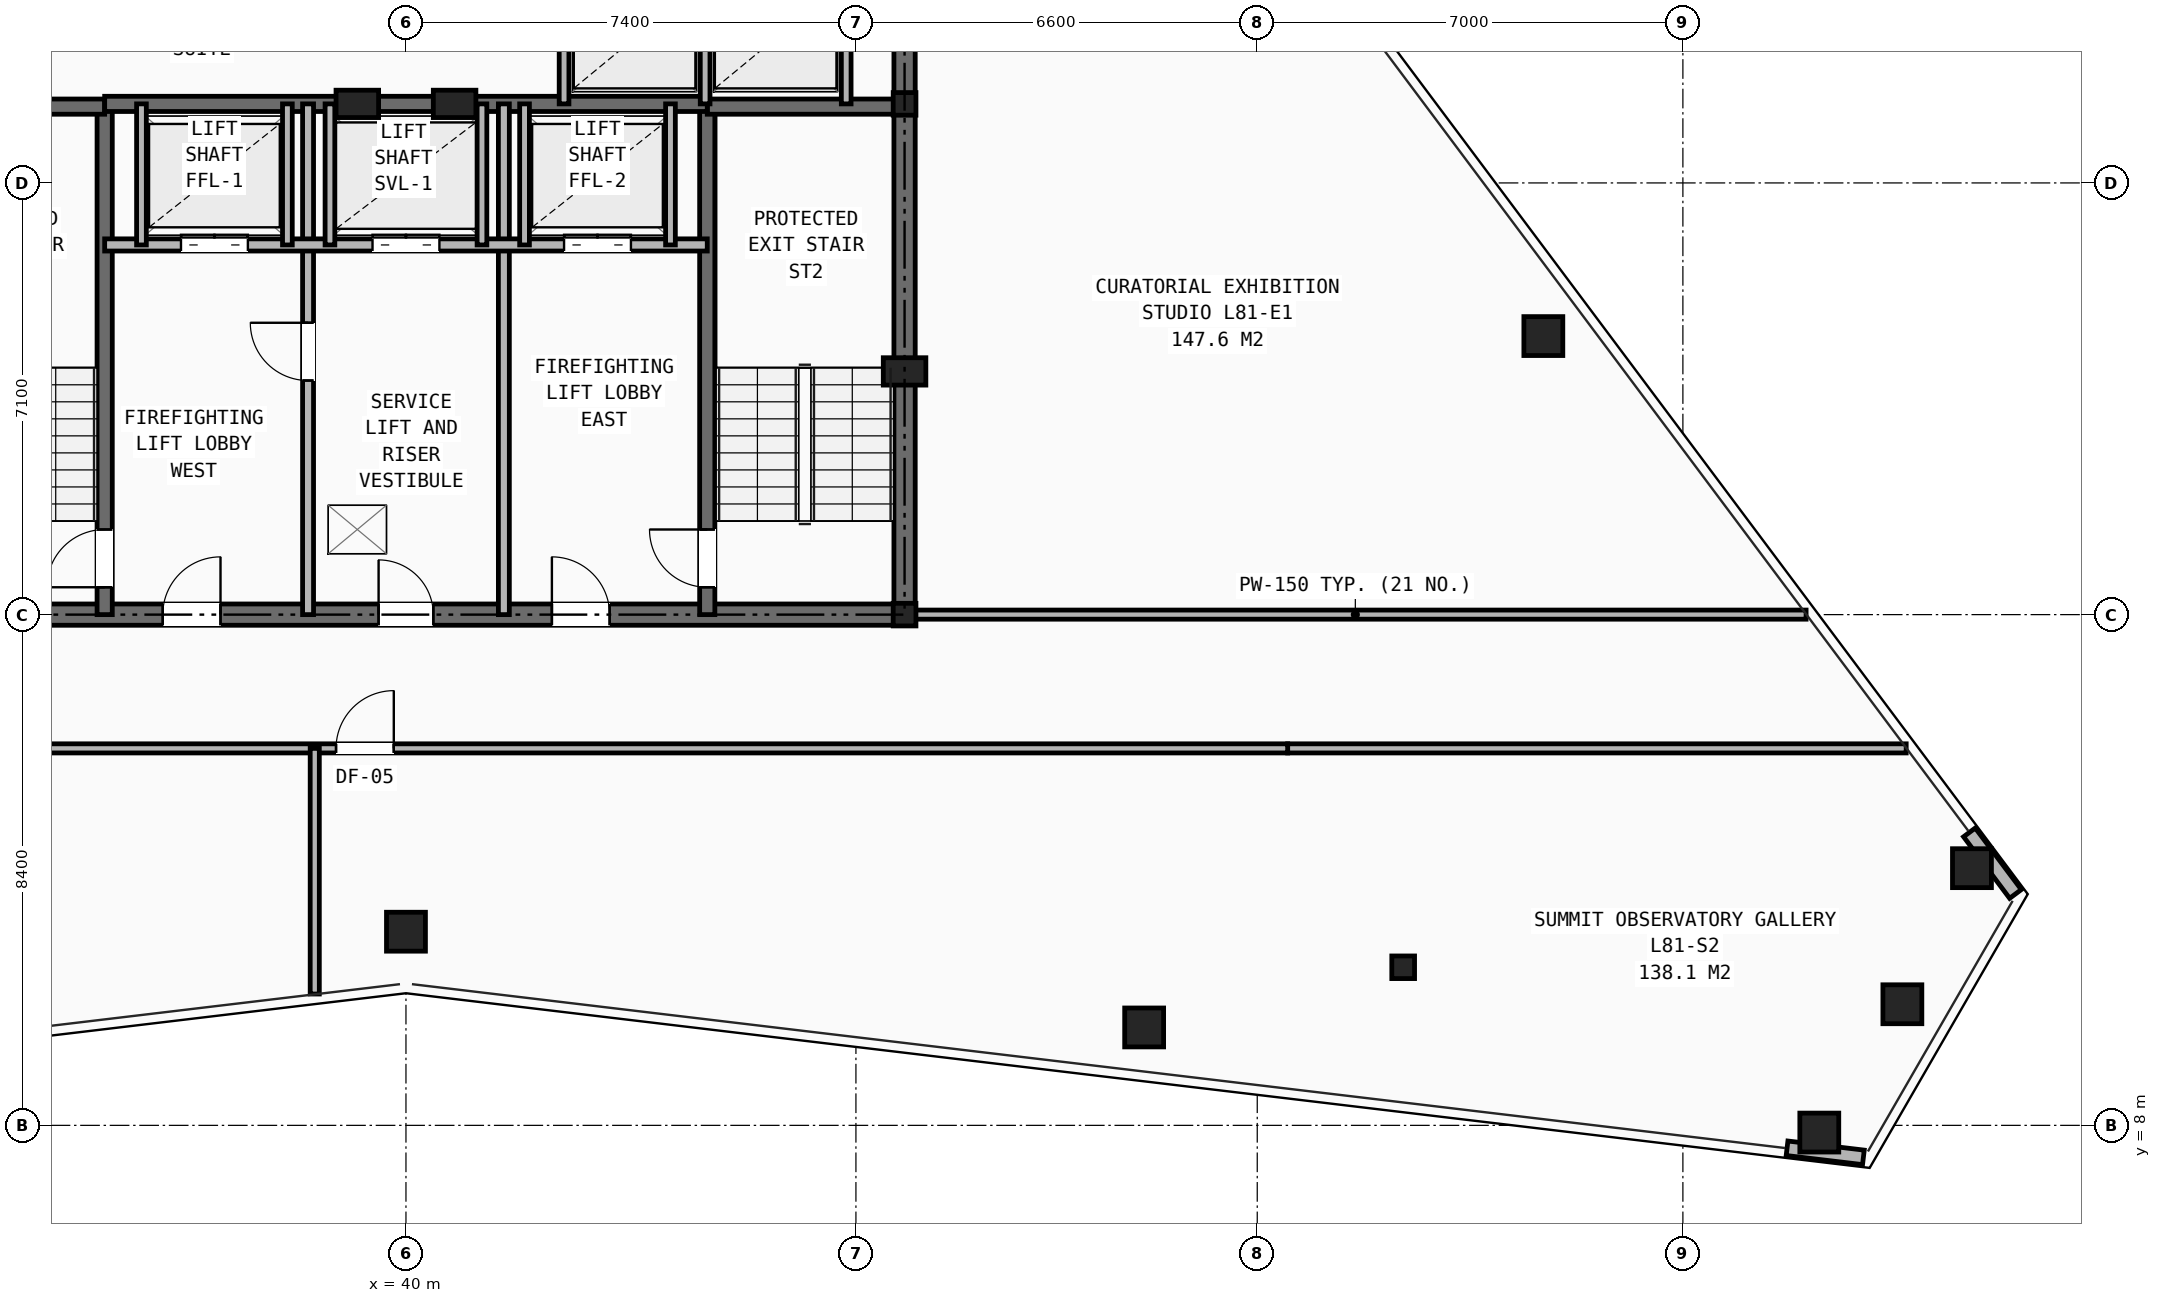
"""IFC4 building model, lengths in metres.
Left out: names, types, materials, properties, quantities, classifications, styles, units other than length and angle.
Written with IfcOpenShell. Run it as: python <this file> out.ifc"""

import sys

from ifc_helpers import new_model, si_unit, direction, frame, frame_2d, origin, origin_2d, place, context, subcontext, project, spatial, rectangle, hollow_rectangle, i_section, extrude, element, fill, save


model = new_model("IFC4")
c1 = context("Model", 3, precision=1e-05, world=origin(), true_north=direction((0.0, 1.0)))
c2 = subcontext(c1, "Body", "Model", "MODEL_VIEW")
j1 = project(units=[si_unit("LENGTHUNIT", "METRE"), si_unit("PLANEANGLEUNIT", "RADIAN")], contexts=[c1])
p1 = place(None, origin())
s1 = spatial("IfcSite", under=j1, at=p1, CompositionType="ELEMENT")
p2 = place(p1, origin())
s2 = spatial("IfcBuilding", under=s1, at=p2, CompositionType="ELEMENT")
p3 = place(p2, frame((0.0, 0.0, 286.5)))
s3 = spatial("IfcBuildingStorey", under=s2, at=p3, CompositionType="ELEMENT", Elevation=286.5)
for number, where, z_axis, x_axis in (
    (1, (48.2, 16.4, 0.0), (0.0, 0.0, 1.0), (1.0, 0.0, 0.0)),
    (2, (48.2, 24.8, 0.0), (0.0, 0.0, 1.0), (1.0, 0.0, 0.0)),
    (3, (56.4, 10.6, 0.0), (0.0, 0.0, 1.0), (1.0, 0.0, 0.0)),
):
    element("IfcColumn", number, at=place(p3, frame(where, z_axis=z_axis, x_axis=x_axis)), inside=s3, PredefinedType="COLUMN", context=c2, shape_type="SweptSolid", body=[
        extrude(i_section(OverallWidth=0.374, OverallDepth=0.372, WebThickness=0.016, FlangeThickness=0.026, at=origin_2d()), origin(), (0.0, 0.0, 1.0), 3.5),
    ])
for number, where, z_axis, x_axis in (
    (4, (48.2, 20.4, 0.0), (0.0, 0.0, 1.0), (1.0, 0.0, 0.0)),
    (5, (39.2, 24.8, 0.0), (0.0, 0.0, 1.0), (1.0, 0.0, 0.0)),
    (6, (40.8, 24.8, 0.0), (0.0, 0.0, 1.0), (1.0, 0.0, 0.0)),
):
    element("IfcColumn", number, at=place(p3, frame(where, z_axis=z_axis, x_axis=x_axis)), inside=s3, PredefinedType="PILASTER", context=c2, shape_type="SweptSolid", body=[
        extrude(rectangle(XDim=0.7, YDim=0.45, at=origin_2d()), origin(), (0.0, 0.0, 1.0), 3.5),
    ])
for number, where, z_axis, x_axis in (
    (7, (40.0, 11.185, 0.0), (0.0, 0.0, 1.0), (1.0, 0.0, 0.0)),
    (8, (52.14, 9.61, 0.0), (0.0, 0.0, 1.0), (1.0, 0.0, 0.0)),
    (9, (63.243, 7.882, 0.0), (0.0, 0.0, 1.0), (1.0, 0.0, 0.0)),
    (10, (64.61, 9.992, 0.0), (0.0, 0.0, 1.0), (1.0, 0.0, 0.0)),
    (11, (65.754, 12.23, 0.0), (0.0, 0.0, 1.0), (1.0, 0.0, 0.0)),
    (12, (58.705, 20.981, 0.0), (0.0, 0.0, 1.0), (1.0, 0.0, 0.0)),
):
    element("IfcColumn", number, at=place(p3, frame(where, z_axis=z_axis, x_axis=x_axis)), inside=s3, PredefinedType="COLUMN", context=c2, shape_type="SweptSolid", body=[
        extrude(hollow_rectangle(XDim=0.64, YDim=0.64, WallThickness=0.045, at=origin_2d()), origin(), (0.0, 0.0, 1.0), 3.5),
    ])
p4 = place(p3, frame((62.713, 7.623, 0.0), z_axis=(0.0, 0.0, 1.0), x_axis=(0.992948828443, -0.118543764469, 0.0)))
e13 = element("IfcWall", 13, at=p4, inside=s3, PredefinedType="SHEAR", context=c2, shape_type="SweptSolid", body=[
    extrude(rectangle(XDim=1.265, YDim=0.24, at=frame_2d((0.632, 0.0))), origin(), (0.0, 0.0, 1.0), 2.573),
])
p5 = place(p3, frame((66.47, 11.806, 0.0), z_axis=(0.0, 0.0, 1.0), x_axis=(-0.5991037677, 0.800671390477, 0.0)))
e14 = element("IfcWall", 14, at=p5, inside=s3, PredefinedType="SHEAR", context=c2, shape_type="SweptSolid", body=[
    extrude(rectangle(XDim=1.264, YDim=0.24, at=frame_2d((0.632, 0.0))), origin(), (0.0, 0.0, 1.0), 2.573),
])
p6 = place(p3, frame((31.8, 16.4, 0.0), z_axis=(0.0, 0.0, 1.0), x_axis=(1.0, 0.0, 0.0)))
e15 = element("IfcWall", 15, at=p6, inside=s3, PredefinedType="SHEAR", context=c2, shape_type="SweptSolid", body=[
    extrude(rectangle(XDim=16.4, YDim=0.35, at=frame_2d((8.2, 0.0))), origin(), (0.0, 0.0, 1.0), 3.2),
])
p7 = place(p6, frame((7.75, 0.0, 0.0)))
e16 = element("IfcOpeningElement", 16, at=p7, cuts=e15, PredefinedType="OPENING", context=c2, shape_type="SweptSolid", body=[
    extrude(rectangle(XDim=0.9, YDim=2.1, at=frame_2d((0.45, 1.05))), frame((0.0, 0.185, 0.0), z_axis=(0.0, -1.0, 0.0), x_axis=(1.0, 0.0, 0.0)), (0.0, 0.0, 1.0), 0.37),
])
p8 = place(p6, frame((4.2, 0.0, 0.0)))
e17 = element("IfcOpeningElement", 17, at=p8, cuts=e15, PredefinedType="OPENING", context=c2, shape_type="SweptSolid", body=[
    extrude(rectangle(XDim=0.95, YDim=2.1, at=frame_2d((0.475, 1.05))), frame((0.0, 0.185, 0.0), z_axis=(0.0, -1.0, 0.0), x_axis=(1.0, 0.0, 0.0)), (0.0, 0.0, 1.0), 0.37),
])
p9 = place(p6, frame((10.6, 0.0, 0.0)))
e18 = element("IfcOpeningElement", 18, at=p9, cuts=e15, PredefinedType="OPENING", context=c2, shape_type="SweptSolid", body=[
    extrude(rectangle(XDim=0.95, YDim=2.1, at=frame_2d((0.475, 1.05))), frame((0.0, 0.185, 0.0), z_axis=(0.0, -1.0, 0.0), x_axis=(1.0, 0.0, 0.0)), (0.0, 0.0, 1.0), 0.37),
])
p10 = place(p3, frame((48.2, 16.4, 0.0), z_axis=(0.0, 0.0, 1.0), x_axis=(0.0, 1.0, 0.0)))
e19 = element("IfcWall", 19, at=p10, inside=s3, PredefinedType="SHEAR", context=c2, shape_type="SweptSolid", body=[
    extrude(rectangle(XDim=14.8, YDim=0.35, at=frame_2d((7.4, 0.0))), origin(), (0.0, 0.0, 1.0), 3.2),
])
p11 = place(p10, frame((11.0, 0.0, 0.0)))
e20 = element("IfcOpeningElement", 20, at=p11, cuts=e19, PredefinedType="OPENING", context=c2, shape_type="SweptSolid", body=[
    extrude(rectangle(XDim=1.1, YDim=2.15, at=frame_2d((0.55, 1.075))), frame((0.0, 0.185, 0.0), z_axis=(0.0, -1.0, 0.0), x_axis=(1.0, 0.0, 0.0)), (0.0, 0.0, 1.0), 0.37),
])
p12 = place(p3, frame((35.045, 16.4, 0.0), z_axis=(0.0, 0.0, 1.0), x_axis=(0.0, 1.0, 0.0)))
e21 = element("IfcWall", 21, at=p12, inside=s3, PredefinedType="SHEAR", context=c2, shape_type="SweptSolid", body=[
    extrude(rectangle(XDim=8.4, YDim=0.25, at=frame_2d((4.2, 0.0))), origin(), (0.0, 0.0, 1.0), 3.2),
])
p13 = place(p12, frame((0.45, 0.0, 0.0)))
e22 = element("IfcOpeningElement", 22, at=p13, cuts=e21, PredefinedType="OPENING", context=c2, shape_type="SweptSolid", body=[
    extrude(rectangle(XDim=0.95, YDim=2.1, at=frame_2d((0.475, 1.05))), frame((0.0, 0.135, 0.0), z_axis=(0.0, -1.0, 0.0), x_axis=(1.0, 0.0, 0.0)), (0.0, 0.0, 1.0), 0.27),
])
p14 = place(p3, frame((31.8, 24.755, 0.0), z_axis=(0.0, 0.0, 1.0), x_axis=(1.0, 0.0, 0.0)))
e23 = element("IfcWall", 23, at=p14, inside=s3, PredefinedType="SHEAR", context=c2, shape_type="SweptSolid", body=[
    extrude(rectangle(XDim=3.245, YDim=0.25, at=frame_2d((1.623, 0.0))), origin(), (0.0, 0.0, 1.0), 3.2),
])
p15 = place(p3, frame((44.955, 16.4, 0.0), z_axis=(0.0, 0.0, 1.0), x_axis=(0.0, 1.0, 0.0)))
e24 = element("IfcWall", 24, at=p15, inside=s3, PredefinedType="SHEAR", context=c2, shape_type="SweptSolid", body=[
    extrude(rectangle(XDim=8.4, YDim=0.25, at=frame_2d((4.2, 0.0))), origin(), (0.0, 0.0, 1.0), 3.2),
])
p16 = place(p15, frame((0.45, 0.0, 0.0)))
e25 = element("IfcOpeningElement", 25, at=p16, cuts=e24, PredefinedType="OPENING", context=c2, shape_type="SweptSolid", body=[
    extrude(rectangle(XDim=0.95, YDim=2.1, at=frame_2d((0.475, 1.05))), frame((0.0, 0.135, 0.0), z_axis=(0.0, -1.0, 0.0), x_axis=(1.0, 0.0, 0.0)), (0.0, 0.0, 1.0), 0.27),
])
p17 = place(p3, frame((44.955, 24.755, 0.0), z_axis=(0.0, 0.0, 1.0), x_axis=(1.0, 0.0, 0.0)))
e26 = element("IfcWall", 26, at=p17, inside=s3, PredefinedType="SHEAR", context=c2, shape_type="SweptSolid", body=[
    extrude(rectangle(XDim=3.245, YDim=0.25, at=frame_2d((1.623, 0.0))), origin(), (0.0, 0.0, 1.0), 3.2),
])
p18 = place(p3, frame((35.045, 24.8, 0.0), z_axis=(0.0, 0.0, 1.0), x_axis=(1.0, 0.0, 0.0)))
e27 = element("IfcWall", 27, at=p18, inside=s3, PredefinedType="SHEAR", context=c2, shape_type="SweptSolid", body=[
    extrude(rectangle(XDim=9.91, YDim=0.25, at=frame_2d((4.955, 0.0))), origin(), (0.0, 0.0, 1.0), 3.2),
])
p19 = place(p3, frame((38.39, 16.4, 0.0), z_axis=(0.0, 0.0, 1.0), x_axis=(0.0, 1.0, 0.0)))
e28 = element("IfcWall", 28, at=p19, inside=s3, PredefinedType="PARTITIONING", context=c2, shape_type="SweptSolid", body=[
    extrude(rectangle(XDim=8.4, YDim=0.18, at=frame_2d((4.2, 0.0))), origin(), (0.0, 0.0, 1.0), 2.655),
])
p20 = place(p19, frame((3.85, 0.0, 0.0)))
e29 = element("IfcOpeningElement", 29, at=p20, cuts=e28, PredefinedType="OPENING", context=c2, shape_type="SweptSolid", body=[
    extrude(rectangle(XDim=0.95, YDim=2.1, at=frame_2d((0.475, 1.05))), frame((0.0, 0.1, 0.0), z_axis=(0.0, -1.0, 0.0), x_axis=(1.0, 0.0, 0.0)), (0.0, 0.0, 1.0), 0.2),
])
p21 = place(p3, frame((41.61, 16.4, 0.0), z_axis=(0.0, 0.0, 1.0), x_axis=(0.0, 1.0, 0.0)))
e30 = element("IfcWall", 30, at=p21, inside=s3, PredefinedType="PARTITIONING", context=c2, shape_type="SweptSolid", body=[
    extrude(rectangle(XDim=8.4, YDim=0.18, at=frame_2d((4.2, 0.0))), origin(), (0.0, 0.0, 1.0), 2.655),
])
p22 = place(p3, frame((35.045, 22.48, 0.0), z_axis=(0.0, 0.0, 1.0), x_axis=(1.0, 0.0, 0.0)))
e31 = element("IfcWall", 31, at=p22, inside=s3, PredefinedType="SOLIDWALL", context=c2, shape_type="SweptSolid", body=[
    extrude(rectangle(XDim=9.91, YDim=0.2, at=frame_2d((4.955, 0.0))), origin(), (0.0, 0.0, 1.0), 3.2),
])
p23 = place(p22, frame((1.255, 0.0, 0.0)))
e32 = element("IfcOpeningElement", 32, at=p23, cuts=e31, PredefinedType="OPENING", context=c2, shape_type="SweptSolid", body=[
    extrude(rectangle(XDim=1.1, YDim=2.15, at=frame_2d((0.55, 1.075))), frame((0.0, 0.11, 0.0), z_axis=(0.0, -1.0, 0.0), x_axis=(1.0, 0.0, 0.0)), (0.0, 0.0, 1.0), 0.22),
])
p24 = place(p22, frame((7.555, 0.0, 0.0)))
e33 = element("IfcOpeningElement", 33, at=p24, cuts=e31, PredefinedType="OPENING", context=c2, shape_type="SweptSolid", body=[
    extrude(rectangle(XDim=1.1, YDim=2.15, at=frame_2d((0.55, 1.075))), frame((0.0, 0.11, 0.0), z_axis=(0.0, -1.0, 0.0), x_axis=(1.0, 0.0, 0.0)), (0.0, 0.0, 1.0), 0.22),
])
p25 = place(p22, frame((4.405, 0.0, 0.0)))
e34 = element("IfcOpeningElement", 34, at=p25, cuts=e31, PredefinedType="OPENING", context=c2, shape_type="SweptSolid", body=[
    extrude(rectangle(XDim=1.1, YDim=2.15, at=frame_2d((0.55, 1.075))), frame((0.0, 0.11, 0.0), z_axis=(0.0, -1.0, 0.0), x_axis=(1.0, 0.0, 0.0)), (0.0, 0.0, 1.0), 0.22),
])
for number, where, z_axis, x_axis in (
    (35, (35.65, 22.48, 0.0), (0.0, 0.0, 1.0), (0.0, 1.0, 0.0)),
    (36, (38.05, 22.48, 0.0), (0.0, 0.0, 1.0), (0.0, 1.0, 0.0)),
    (37, (41.95, 22.48, 0.0), (0.0, 0.0, 1.0), (0.0, 1.0, 0.0)),
    (38, (44.35, 22.48, 0.0), (0.0, 0.0, 1.0), (0.0, 1.0, 0.0)),
    (39, (38.75, 22.48, 0.0), (0.0, 0.0, 1.0), (0.0, 1.0, 0.0)),
    (40, (41.25, 22.48, 0.0), (0.0, 0.0, 1.0), (0.0, 1.0, 0.0)),
):
    element("IfcWall", number, at=place(p3, frame(where, z_axis=z_axis, x_axis=x_axis)), inside=s3, PredefinedType="SOLIDWALL", context=c2, shape_type="SweptSolid", body=[
        extrude(rectangle(XDim=2.32, YDim=0.16, at=frame_2d((1.16, 0.0))), origin(), (0.0, 0.0, 1.0), 3.2),
    ])
for number, where, z_axis, x_axis in (
    (41, (42.6, 24.8, 0.0), (0.0, 0.0, 1.0), (0.0, 1.0, 0.0)),
    (42, (44.92, 24.8, 0.0), (0.0, 0.0, 1.0), (0.0, 1.0, 0.0)),
    (43, (47.24, 24.8, 0.0), (0.0, 0.0, 1.0), (0.0, 1.0, 0.0)),
):
    element("IfcWall", number, at=place(p3, frame(where, z_axis=z_axis, x_axis=x_axis)), inside=s3, PredefinedType="SOLIDWALL", context=c2, shape_type="SweptSolid", body=[
        extrude(rectangle(XDim=2.08, YDim=0.16, at=frame_2d((1.04, 0.0))), origin(), (0.0, 0.0, 1.0), 3.2),
    ])
p26 = place(p3, frame((54.5, 14.2, 0.0), z_axis=(0.0, 0.0, 1.0), x_axis=(1.0, 0.0, 0.0)))
e44 = element("IfcWall", 44, at=p26, inside=s3, PredefinedType="PARTITIONING", context=c2, shape_type="SweptSolid", body=[
    extrude(rectangle(XDim=10.172, YDim=0.15, at=frame_2d((5.086, 0.0))), origin(), (0.0, 0.0, 1.0), 2.242),
])
p27 = place(p3, frame((48.2, 16.4, 0.0), z_axis=(0.0, 0.0, 1.0), x_axis=(1.0, 0.0, 0.0)))
e45 = element("IfcWall", 45, at=p27, inside=s3, PredefinedType="PARTITIONING", context=c2, shape_type="SweptSolid", body=[
    extrude(rectangle(XDim=14.826, YDim=0.15, at=frame_2d((7.413, 0.0))), origin(), (0.0, 0.0, 1.0), 2.242),
])
p28 = place(p3, frame((25.5, 14.2, 0.0), z_axis=(0.0, 0.0, 1.0), x_axis=(1.0, 0.0, 0.0)))
e46 = element("IfcWall", 46, at=p28, inside=s3, PredefinedType="PARTITIONING", context=c2, shape_type="SweptSolid", body=[
    extrude(rectangle(XDim=29.0, YDim=0.15, at=frame_2d((14.5, 0.0))), origin(), (0.0, 0.0, 1.0), 2.242),
])
p29 = place(p28, frame((0.85, 0.0, 0.0)))
e47 = element("IfcOpeningElement", 47, at=p29, cuts=e46, PredefinedType="OPENING", context=c2, shape_type="SweptSolid", body=[
    extrude(rectangle(XDim=0.95, YDim=2.1, at=frame_2d((0.475, 1.05))), frame((0.0, 0.085, 0.0), z_axis=(0.0, -1.0, 0.0), x_axis=(1.0, 0.0, 0.0)), (0.0, 0.0, 1.0), 0.17),
])
p30 = place(p28, frame((13.35, 0.0, 0.0)))
e48 = element("IfcOpeningElement", 48, at=p30, cuts=e46, PredefinedType="OPENING", context=c2, shape_type="SweptSolid", body=[
    extrude(rectangle(XDim=0.95, YDim=2.1, at=frame_2d((0.475, 1.05))), frame((0.0, 0.085, 0.0), z_axis=(0.0, -1.0, 0.0), x_axis=(1.0, 0.0, 0.0)), (0.0, 0.0, 1.0), 0.17),
])
p31 = place(p3, frame((38.5, 10.16, 0.0), z_axis=(0.0, 0.0, 1.0), x_axis=(0.0, 1.0, 0.0)))
e49 = element("IfcWall", 49, at=p31, inside=s3, PredefinedType="PARTITIONING", context=c2, shape_type="SweptSolid", body=[
    extrude(rectangle(XDim=4.04, YDim=0.15, at=frame_2d((2.02, 0.0))), origin(), (0.0, 0.0, 1.0), 2.242),
])
p32 = place(p7, origin())
e50 = element("IfcDoor", 50, at=p32, inside=s3, OperationType="SINGLE_SWING_LEFT", PredefinedType="DOOR", context=c2, shape_type="SweptSolid", body=[
    extrude(rectangle(XDim=0.9, YDim=2.1, at=frame_2d((0.45, 1.05))), frame((0.0, 0.025, 0.0), z_axis=(0.0, -1.0, 0.0), x_axis=(1.0, 0.0, 0.0)), (0.0, 0.0, 1.0), 0.05),
])
fill(e16, e50)
p33 = place(p20, origin())
e51 = element("IfcDoor", 51, at=p33, inside=s3, OperationType="SINGLE_SWING_RIGHT", PredefinedType="DOOR", context=c2, shape_type="SweptSolid", body=[
    extrude(rectangle(XDim=0.95, YDim=2.1, at=frame_2d((0.475, 1.05))), frame((0.0, 0.025, 0.0), z_axis=(0.0, -1.0, 0.0), x_axis=(1.0, 0.0, 0.0)), (0.0, 0.0, 1.0), 0.05),
])
fill(e29, e51)
p34 = place(p13, origin())
e52 = element("IfcDoor", 52, at=p34, inside=s3, OperationType="SINGLE_SWING_LEFT", PredefinedType="DOOR", context=c2, shape_type="SweptSolid", body=[
    extrude(rectangle(XDim=0.95, YDim=2.1, at=frame_2d((0.475, 1.05))), frame((0.0, 0.025, 0.0), z_axis=(0.0, -1.0, 0.0), x_axis=(1.0, 0.0, 0.0)), (0.0, 0.0, 1.0), 0.05),
])
fill(e22, e52)
p35 = place(p16, origin())
e53 = element("IfcDoor", 53, at=p35, inside=s3, OperationType="SINGLE_SWING_RIGHT", PredefinedType="DOOR", context=c2, shape_type="SweptSolid", body=[
    extrude(rectangle(XDim=0.95, YDim=2.1, at=frame_2d((0.475, 1.05))), frame((0.0, 0.025, 0.0), z_axis=(0.0, -1.0, 0.0), x_axis=(1.0, 0.0, 0.0)), (0.0, 0.0, 1.0), 0.05),
])
fill(e25, e53)
p36 = place(p8, origin())
e54 = element("IfcDoor", 54, at=p36, inside=s3, OperationType="SINGLE_SWING_RIGHT", PredefinedType="DOOR", context=c2, shape_type="SweptSolid", body=[
    extrude(rectangle(XDim=0.95, YDim=2.1, at=frame_2d((0.475, 1.05))), frame((0.0, 0.025, 0.0), z_axis=(0.0, -1.0, 0.0), x_axis=(1.0, 0.0, 0.0)), (0.0, 0.0, 1.0), 0.05),
])
fill(e17, e54)
p37 = place(p9, origin())
e55 = element("IfcDoor", 55, at=p37, inside=s3, OperationType="SINGLE_SWING_LEFT", PredefinedType="DOOR", context=c2, shape_type="SweptSolid", body=[
    extrude(rectangle(XDim=0.95, YDim=2.1, at=frame_2d((0.475, 1.05))), frame((0.0, 0.025, 0.0), z_axis=(0.0, -1.0, 0.0), x_axis=(1.0, 0.0, 0.0)), (0.0, 0.0, 1.0), 0.05),
])
fill(e18, e55)
p38 = place(p23, origin())
e56 = element("IfcDoor", 56, at=p38, inside=s3, OperationType="DOUBLE_DOOR_SLIDING", PredefinedType="DOOR", context=c2, shape_type="SweptSolid", body=[
    extrude(rectangle(XDim=1.1, YDim=2.15, at=frame_2d((0.55, 1.075))), frame((0.0, 0.025, 0.0), z_axis=(0.0, -1.0, 0.0), x_axis=(1.0, 0.0, 0.0)), (0.0, 0.0, 1.0), 0.05),
])
fill(e32, e56)
p39 = place(p24, origin())
e57 = element("IfcDoor", 57, at=p39, inside=s3, OperationType="DOUBLE_DOOR_SLIDING", PredefinedType="DOOR", context=c2, shape_type="SweptSolid", body=[
    extrude(rectangle(XDim=1.1, YDim=2.15, at=frame_2d((0.55, 1.075))), frame((0.0, 0.025, 0.0), z_axis=(0.0, -1.0, 0.0), x_axis=(1.0, 0.0, 0.0)), (0.0, 0.0, 1.0), 0.05),
])
fill(e33, e57)
p40 = place(p25, origin())
e58 = element("IfcDoor", 58, at=p40, inside=s3, OperationType="DOUBLE_DOOR_SLIDING", PredefinedType="DOOR", context=c2, shape_type="SweptSolid", body=[
    extrude(rectangle(XDim=1.1, YDim=2.15, at=frame_2d((0.55, 1.075))), frame((0.0, 0.025, 0.0), z_axis=(0.0, -1.0, 0.0), x_axis=(1.0, 0.0, 0.0)), (0.0, 0.0, 1.0), 0.05),
])
fill(e34, e58)
p41 = place(p30, origin())
e59 = element("IfcDoor", 59, at=p41, inside=s3, OperationType="SINGLE_SWING_RIGHT", PredefinedType="DOOR", context=c2, shape_type="SweptSolid", body=[
    extrude(rectangle(XDim=0.95, YDim=2.1, at=frame_2d((0.475, 1.05))), frame((0.0, 0.025, 0.0), z_axis=(0.0, -1.0, 0.0), x_axis=(1.0, 0.0, 0.0)), (0.0, 0.0, 1.0), 0.05),
])
fill(e48, e59)
save(model, sys.argv[1])
